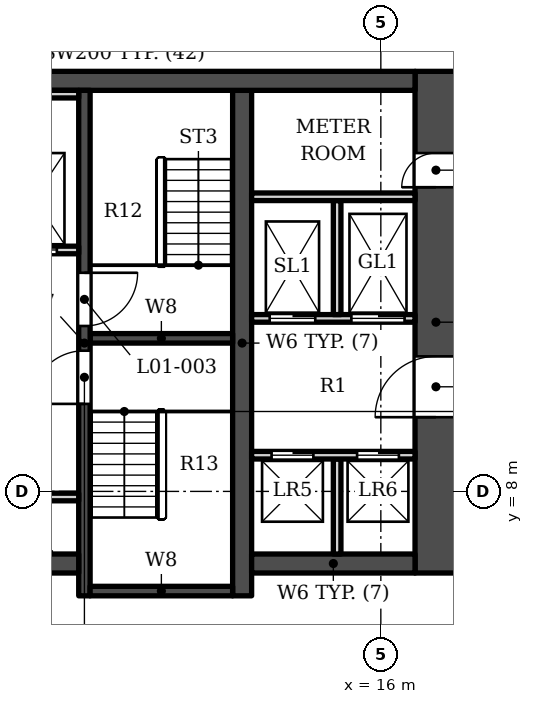
"""IFC4 building model, lengths in metres.
Left out: names, types, materials, properties, quantities, classifications, styles, units other than length and angle.
Written with IfcOpenShell. Run it as: python <this file> out.ifc"""

import sys

from ifc_helpers import new_model, si_unit, direction, frame, frame_2d, origin, place, context, subcontext, project, spatial, rectangle, extrude, element, fill, save


model = new_model("IFC4")
c1 = context("Model", 3, precision=1e-05, world=origin(), true_north=direction((0.0, 1.0)))
c2 = subcontext(c1, "Body", "Model", "MODEL_VIEW")
j1 = project(units=[si_unit("LENGTHUNIT", "METRE"), si_unit("PLANEANGLEUNIT", "RADIAN")], contexts=[c1])
p1 = place(None, origin())
s1 = spatial("IfcSite", under=j1, at=p1, CompositionType="ELEMENT")
p2 = place(p1, origin())
s2 = spatial("IfcBuilding", under=s1, at=p2, CompositionType="ELEMENT")
p3 = place(p2, frame((0.0, 0.0, 9.0)))
s3 = spatial("IfcBuildingStorey", under=s2, at=p3, CompositionType="ELEMENT", Elevation=9.0)
p4 = place(p3, frame((-16.9, 18.802, 0.0), z_axis=(0.0, 0.0, 1.0), x_axis=(1.0, 0.0, 0.0)))
e1 = element("IfcWall", 1, at=p4, inside=s3, PredefinedType="SHEAR", context=c2, shape_type="SweptSolid", body=[
    extrude(rectangle(XDim=33.8, YDim=0.5, at=frame_2d((16.9, 0.0))), origin(), (0.0, 0.0, 1.0), 11.0),
])
p5 = place(p3, frame((12.35, 5.253, 0.0), z_axis=(0.0, 0.0, 1.0), x_axis=(0.0, 1.0, 0.0)))
e2 = element("IfcWall", 2, at=p5, inside=s3, PredefinedType="SHEAR", context=c2, shape_type="SweptSolid", body=[
    extrude(rectangle(XDim=13.3, YDim=0.5, at=frame_2d((6.65, 0.0))), origin(), (0.0, 0.0, 1.0), 11.0),
])
p6 = place(p3, frame((8.2, 5.253, 0.0), z_axis=(0.0, 0.0, 1.0), x_axis=(0.0, 1.0, 0.0)))
e3 = element("IfcWall", 3, at=p6, inside=s3, PredefinedType="SHEAR", context=c2, shape_type="SweptSolid", body=[
    extrude(rectangle(XDim=13.3, YDim=0.3, at=frame_2d((6.65, 0.0))), origin(), (0.0, 0.0, 1.0), 11.0),
])
p7 = place(p6, frame((7.1, 0.0, 0.0)))
e4 = element("IfcOpeningElement", 4, at=p7, cuts=e3, PredefinedType="OPENING", context=c2, shape_type="SweptSolid", body=[
    extrude(rectangle(XDim=1.4, YDim=2.1, at=frame_2d((0.7, 1.05))), frame((0.0, 0.16, 0.0), z_axis=(0.0, -1.0, 0.0), x_axis=(1.0, 0.0, 0.0)), (0.0, 0.0, 1.0), 0.32),
])
p8 = place(p6, frame((5.05, 0.0, 0.0)))
e5 = element("IfcOpeningElement", 5, at=p8, cuts=e3, PredefinedType="OPENING", context=c2, shape_type="SweptSolid", body=[
    extrude(rectangle(XDim=1.4, YDim=2.1, at=frame_2d((0.7, 1.05))), frame((0.0, 0.16, 0.0), z_axis=(0.0, -1.0, 0.0), x_axis=(1.0, 0.0, 0.0)), (0.0, 0.0, 1.0), 0.32),
])
for number, where, z_axis, x_axis in (
    (6, (8.35, 12.028, 0.0), (0.0, 0.0, 1.0), (1.0, 0.0, 0.0)),
    (7, (8.35, 5.378, 0.0), (0.0, 0.0, 1.0), (1.0, 0.0, 0.0)),
):
    element("IfcWall", number, at=place(p3, frame(where, z_axis=z_axis, x_axis=x_axis)), inside=s3, PredefinedType="SHEAR", context=c2, shape_type="SweptSolid", body=[
        extrude(rectangle(XDim=3.75, YDim=0.25, at=frame_2d((1.875, 0.0))), origin(), (0.0, 0.0, 1.0), 11.0),
    ])
p9 = place(p3, frame((1.0, 6.103, 0.0), z_axis=(0.0, 0.0, 1.0), x_axis=(1.0, 0.0, 0.0)))
e8 = element("IfcWall", 8, at=p9, inside=s3, PredefinedType="SHEAR", context=c2, shape_type="SweptSolid", body=[
    extrude(rectangle(XDim=7.05, YDim=0.5, at=frame_2d((3.525, 0.0))), origin(), (0.0, 0.0, 1.0), 11.0),
])
p10 = place(p9, frame((5.325, 0.0, 0.0)))
e9 = element("IfcOpeningElement", 9, at=p10, cuts=e8, PredefinedType="OPENING", context=c2, shape_type="SweptSolid", body=[
    extrude(rectangle(XDim=0.9, YDim=2.1, at=frame_2d((0.45, 1.05))), frame((0.0, 0.26, 0.0), z_axis=(0.0, -1.0, 0.0), x_axis=(1.0, 0.0, 0.0)), (0.0, 0.0, 1.0), 0.52),
])
p11 = place(p3, frame((12.6, 6.103, 0.0), z_axis=(0.0, 0.0, 1.0), x_axis=(1.0, 0.0, 0.0)))
e10 = element("IfcWall", 10, at=p11, inside=s3, PredefinedType="SHEAR", context=c2, shape_type="SweptSolid", body=[
    extrude(rectangle(XDim=4.3, YDim=0.5, at=frame_2d((2.15, 0.0))), origin(), (0.0, 0.0, 1.0), 11.0),
])
p12 = place(p3, frame((17.45, 5.853, 0.0), z_axis=(0.0, 0.0, 1.0), x_axis=(0.0, 1.0, 0.0)))
e11 = element("IfcWall", 11, at=p12, inside=s3, PredefinedType="SHEAR", context=c2, shape_type="SweptSolid", body=[
    extrude(rectangle(XDim=13.2, YDim=1.1, at=frame_2d((6.6, 0.0))), origin(), (0.0, 0.0, 1.0), 11.0),
])
p13 = place(p12, frame((4.1, 0.0, 0.0)))
e12 = element("IfcOpeningElement", 12, at=p13, cuts=e11, PredefinedType="OPENING", context=c2, shape_type="SweptSolid", body=[
    extrude(rectangle(XDim=1.6, YDim=2.1, at=frame_2d((0.8, 1.05))), frame((0.0, 0.56, 0.0), z_axis=(0.0, -1.0, 0.0), x_axis=(1.0, 0.0, 0.0)), (0.0, 0.0, 1.0), 1.12),
])
p14 = place(p12, frame((10.15, 0.0, 0.0)))
e13 = element("IfcOpeningElement", 13, at=p14, cuts=e11, PredefinedType="OPENING", context=c2, shape_type="SweptSolid", body=[
    extrude(rectangle(XDim=0.9, YDim=2.1, at=frame_2d((0.45, 1.05))), frame((0.0, 0.56, 0.0), z_axis=(0.0, -1.0, 0.0), x_axis=(1.0, 0.0, 0.0)), (0.0, 0.0, 1.0), 1.12),
])
for number, where, z_axis, x_axis in (
    (14, (14.85, 6.353, 0.0), (0.0, 0.0, 1.0), (0.0, 1.0, 0.0)),
    (15, (5.55, 7.853, 0.0), (0.0, 0.0, 1.0), (1.0, 0.0, 0.0)),
):
    element("IfcWall", number, at=place(p3, frame(where, z_axis=z_axis, x_axis=x_axis)), inside=s3, PredefinedType="SOLIDWALL", context=c2, shape_type="SweptSolid", body=[
        extrude(rectangle(XDim=2.5, YDim=0.2, at=frame_2d((1.25, 0.0))), origin(), (0.0, 0.0, 1.0), 10.5),
    ])
p15 = place(p3, frame((12.6, 8.953, 0.0), z_axis=(0.0, 0.0, 1.0), x_axis=(1.0, 0.0, 0.0)))
e16 = element("IfcWall", 16, at=p15, inside=s3, PredefinedType="SOLIDWALL", context=c2, shape_type="SweptSolid", body=[
    extrude(rectangle(XDim=4.3, YDim=0.2, at=frame_2d((2.15, 0.0))), origin(), (0.0, 0.0, 1.0), 10.5),
])
p16 = place(p15, frame((0.525, 0.0, 0.0)))
e17 = element("IfcOpeningElement", 17, at=p16, cuts=e16, PredefinedType="OPENING", context=c2, shape_type="SweptSolid", body=[
    extrude(rectangle(XDim=1.1, YDim=2.1, at=frame_2d((0.55, 1.05))), frame((0.0, 0.11, 0.0), z_axis=(0.0, -1.0, 0.0), x_axis=(1.0, 0.0, 0.0)), (0.0, 0.0, 1.0), 0.22),
])
p17 = place(p15, frame((2.775, 0.0, 0.0)))
e18 = element("IfcOpeningElement", 18, at=p17, cuts=e16, PredefinedType="OPENING", context=c2, shape_type="SweptSolid", body=[
    extrude(rectangle(XDim=1.1, YDim=2.1, at=frame_2d((0.55, 1.05))), frame((0.0, 0.11, 0.0), z_axis=(0.0, -1.0, 0.0), x_axis=(1.0, 0.0, 0.0)), (0.0, 0.0, 1.0), 0.22),
])
p18 = place(p3, frame((12.6, 12.552, 0.0), z_axis=(0.0, 0.0, 1.0), x_axis=(1.0, 0.0, 0.0)))
e19 = element("IfcWall", 19, at=p18, inside=s3, PredefinedType="SOLIDWALL", context=c2, shape_type="SweptSolid", body=[
    extrude(rectangle(XDim=4.3, YDim=0.2, at=frame_2d((2.15, 0.0))), origin(), (0.0, 0.0, 1.0), 10.5),
])
p19 = place(p18, frame((0.475, 0.0, 0.0)))
e20 = element("IfcOpeningElement", 20, at=p19, cuts=e19, PredefinedType="OPENING", context=c2, shape_type="SweptSolid", body=[
    extrude(rectangle(XDim=1.2, YDim=2.1, at=frame_2d((0.6, 1.05))), frame((0.0, 0.11, 0.0), z_axis=(0.0, -1.0, 0.0), x_axis=(1.0, 0.0, 0.0)), (0.0, 0.0, 1.0), 0.22),
])
p20 = place(p18, frame((2.625, 0.0, 0.0)))
e21 = element("IfcOpeningElement", 21, at=p20, cuts=e19, PredefinedType="OPENING", context=c2, shape_type="SweptSolid", body=[
    extrude(rectangle(XDim=1.4, YDim=2.1, at=frame_2d((0.7, 1.05))), frame((0.0, 0.11, 0.0), z_axis=(0.0, -1.0, 0.0), x_axis=(1.0, 0.0, 0.0)), (0.0, 0.0, 1.0), 0.22),
])
p21 = place(p3, frame((14.85, 12.653, 0.0), z_axis=(0.0, 0.0, 1.0), x_axis=(0.0, 1.0, 0.0)))
e22 = element("IfcWall", 22, at=p21, inside=s3, PredefinedType="SOLIDWALL", context=c2, shape_type="SweptSolid", body=[
    extrude(rectangle(XDim=3.0, YDim=0.2, at=frame_2d((1.5, 0.0))), origin(), (0.0, 0.0, 1.0), 10.5),
])
p22 = place(p3, frame((5.3, 14.353, 0.0), z_axis=(0.0, 0.0, 1.0), x_axis=(1.0, 0.0, 0.0)))
e23 = element("IfcWall", 23, at=p22, inside=s3, PredefinedType="SOLIDWALL", context=c2, shape_type="SweptSolid", body=[
    extrude(rectangle(XDim=2.75, YDim=0.2, at=frame_2d((1.375, 0.0))), origin(), (0.0, 0.0, 1.0), 10.5),
])
p23 = place(p22, frame((0.975, 0.0, 0.0)))
e24 = element("IfcOpeningElement", 24, at=p23, cuts=e23, PredefinedType="OPENING", context=c2, shape_type="SweptSolid", body=[
    extrude(rectangle(XDim=1.2, YDim=2.1, at=frame_2d((0.6, 1.05))), frame((0.0, 0.11, 0.0), z_axis=(0.0, -1.0, 0.0), x_axis=(1.0, 0.0, 0.0)), (0.0, 0.0, 1.0), 0.22),
])
p24 = place(p3, frame((12.6, 15.753, 0.0), z_axis=(0.0, 0.0, 1.0), x_axis=(1.0, 0.0, 0.0)))
e25 = element("IfcWall", 25, at=p24, inside=s3, PredefinedType="SOLIDWALL", context=c2, shape_type="SweptSolid", body=[
    extrude(rectangle(XDim=4.3, YDim=0.2, at=frame_2d((2.15, 0.0))), origin(), (0.0, 0.0, 1.0), 10.5),
])
p25 = place(p3, frame((5.5, 18.453, 0.0), z_axis=(0.0, 0.0, 1.0), x_axis=(1.0, 0.0, 0.0)))
e26 = element("IfcWall", 26, at=p25, inside=s3, PredefinedType="SOLIDWALL", context=c2, shape_type="SweptSolid", body=[
    extrude(rectangle(XDim=2.55, YDim=0.2, at=frame_2d((1.275, 0.0))), origin(), (0.0, 0.0, 1.0), 10.5),
])
p26 = place(p23, origin())
e27 = element("IfcDoor", 27, at=p26, inside=s3, OperationType="DOUBLE_DOOR_SLIDING", PredefinedType="DOOR", context=c2, shape_type="SweptSolid", body=[
    extrude(rectangle(XDim=1.2, YDim=2.1, at=frame_2d((0.6, 1.05))), frame((0.0, 0.025, 0.0), z_axis=(0.0, -1.0, 0.0), x_axis=(1.0, 0.0, 0.0)), (0.0, 0.0, 1.0), 0.05),
])
fill(e24, e27)
p27 = place(p16, origin())
e28 = element("IfcDoor", 28, at=p27, inside=s3, OperationType="DOUBLE_DOOR_SLIDING", PredefinedType="DOOR", context=c2, shape_type="SweptSolid", body=[
    extrude(rectangle(XDim=1.1, YDim=2.1, at=frame_2d((0.55, 1.05))), frame((0.0, 0.025, 0.0), z_axis=(0.0, -1.0, 0.0), x_axis=(1.0, 0.0, 0.0)), (0.0, 0.0, 1.0), 0.05),
])
fill(e17, e28)
p28 = place(p17, origin())
e29 = element("IfcDoor", 29, at=p28, inside=s3, OperationType="DOUBLE_DOOR_SLIDING", PredefinedType="DOOR", context=c2, shape_type="SweptSolid", body=[
    extrude(rectangle(XDim=1.1, YDim=2.1, at=frame_2d((0.55, 1.05))), frame((0.0, 0.025, 0.0), z_axis=(0.0, -1.0, 0.0), x_axis=(1.0, 0.0, 0.0)), (0.0, 0.0, 1.0), 0.05),
])
fill(e18, e29)
p29 = place(p19, origin())
e30 = element("IfcDoor", 30, at=p29, inside=s3, OperationType="DOUBLE_DOOR_SLIDING", PredefinedType="DOOR", context=c2, shape_type="SweptSolid", body=[
    extrude(rectangle(XDim=1.2, YDim=2.1, at=frame_2d((0.6, 1.05))), frame((0.0, 0.025, 0.0), z_axis=(0.0, -1.0, 0.0), x_axis=(1.0, 0.0, 0.0)), (0.0, 0.0, 1.0), 0.05),
])
fill(e20, e30)
p30 = place(p20, origin())
e31 = element("IfcDoor", 31, at=p30, inside=s3, OperationType="DOUBLE_DOOR_SLIDING", PredefinedType="DOOR", context=c2, shape_type="SweptSolid", body=[
    extrude(rectangle(XDim=1.4, YDim=2.1, at=frame_2d((0.7, 1.05))), frame((0.0, 0.025, 0.0), z_axis=(0.0, -1.0, 0.0), x_axis=(1.0, 0.0, 0.0)), (0.0, 0.0, 1.0), 0.05),
])
fill(e21, e31)
p31 = place(p7, origin())
e32 = element("IfcDoor", 32, at=p31, inside=s3, OperationType="SINGLE_SWING_RIGHT", PredefinedType="DOOR", context=c2, shape_type="SweptSolid", body=[
    extrude(rectangle(XDim=1.4, YDim=2.1, at=frame_2d((0.7, 1.05))), frame((0.0, 0.025, 0.0), z_axis=(0.0, -1.0, 0.0), x_axis=(1.0, 0.0, 0.0)), (0.0, 0.0, 1.0), 0.05),
])
fill(e4, e32)
p32 = place(p8, origin())
e33 = element("IfcDoor", 33, at=p32, inside=s3, OperationType="SINGLE_SWING_LEFT", PredefinedType="DOOR", context=c2, shape_type="SweptSolid", body=[
    extrude(rectangle(XDim=1.4, YDim=2.1, at=frame_2d((0.7, 1.05))), frame((0.0, 0.025, 0.0), z_axis=(0.0, -1.0, 0.0), x_axis=(1.0, 0.0, 0.0)), (0.0, 0.0, 1.0), 0.05),
])
fill(e5, e33)
p33 = place(p13, origin())
e34 = element("IfcDoor", 34, at=p33, inside=s3, OperationType="DOUBLE_DOOR_SINGLE_SWING", PredefinedType="DOOR", context=c2, shape_type="SweptSolid", body=[
    extrude(rectangle(XDim=1.6, YDim=2.1, at=frame_2d((0.8, 1.05))), frame((0.0, 0.275, 0.0), z_axis=(0.0, -1.0, 0.0), x_axis=(1.0, 0.0, 0.0)), (0.0, 0.0, 1.0), 0.05),
])
fill(e12, e34)
p34 = place(p14, origin())
e35 = element("IfcDoor", 35, at=p34, inside=s3, OperationType="SINGLE_SWING_LEFT", PredefinedType="DOOR", context=c2, shape_type="SweptSolid", body=[
    extrude(rectangle(XDim=0.9, YDim=2.1, at=frame_2d((0.45, 1.05))), frame((0.0, 0.275, 0.0), z_axis=(0.0, -1.0, 0.0), x_axis=(1.0, 0.0, 0.0)), (0.0, 0.0, 1.0), 0.05),
])
fill(e13, e35)
save(model, sys.argv[1])
